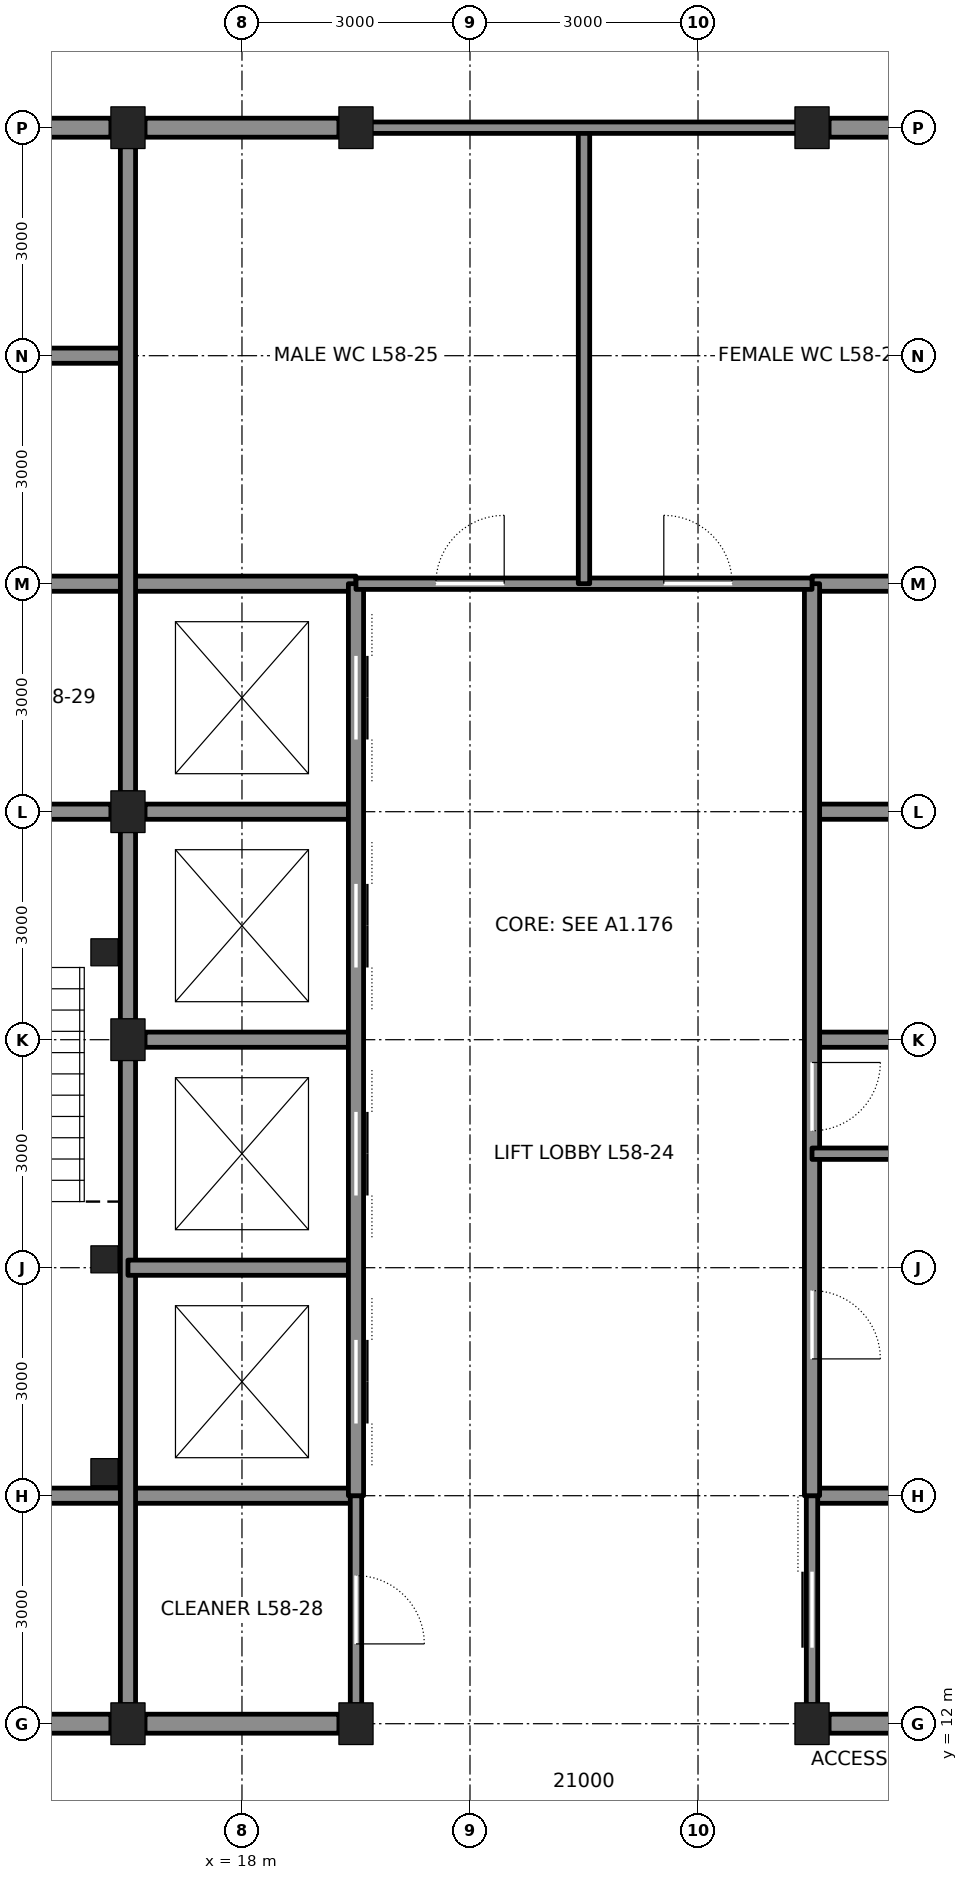
"""IFC4 building model, lengths in metres.
Left out: names, types, materials, properties, quantities, classifications, styles, units other than length and angle.
Written with IfcOpenShell. Run it as: python <this file> out.ifc"""

import sys

from ifc_helpers import new_model, si_unit, direction, frame, frame_2d, origin, origin_2d, place, context, subcontext, project, spatial, rectangle, hollow_rectangle, i_section, extrude, element, fill, save


model = new_model("IFC4")
c1 = context("Model", 3, precision=1e-05, world=origin(), true_north=direction((0.0, 1.0)))
c2 = subcontext(c1, "Body", "Model", "MODEL_VIEW")
j1 = project(units=[si_unit("LENGTHUNIT", "METRE"), si_unit("PLANEANGLEUNIT", "RADIAN")], contexts=[c1])
p1 = place(None, origin())
s1 = spatial("IfcSite", under=j1, at=p1, CompositionType="ELEMENT")
p2 = place(p1, origin())
s2 = spatial("IfcBuilding", under=s1, at=p2, CompositionType="ELEMENT")
p3 = place(p2, frame((0.0, 0.0, 262.2)))
s3 = spatial("IfcBuildingStorey", under=s2, at=p3, CompositionType="ELEMENT", Elevation=262.2)
for number, where, z_axis, x_axis in (
    (1, (16.5, 12.0, 0.0), (0.0, 0.0, 1.0), (1.0, 0.0, 0.0)),
    (2, (19.5, 12.0, 0.0), (0.0, 0.0, 1.0), (1.0, 0.0, 0.0)),
    (3, (25.5, 12.0, 0.0), (0.0, 0.0, 1.0), (1.0, 0.0, 0.0)),
    (4, (16.5, 33.0, 0.0), (0.0, 0.0, 1.0), (1.0, 0.0, 0.0)),
    (5, (19.5, 33.0, 0.0), (0.0, 0.0, 1.0), (1.0, 0.0, 0.0)),
    (6, (25.5, 33.0, 0.0), (0.0, 0.0, 1.0), (1.0, 0.0, 0.0)),
    (7, (16.5, 21.0, 0.0), (0.0, 0.0, 1.0), (1.0, 0.0, 0.0)),
    (8, (16.5, 24.0, 0.0), (0.0, 0.0, 1.0), (1.0, 0.0, 0.0)),
):
    element("IfcColumn", number, at=place(p3, frame(where, z_axis=z_axis, x_axis=x_axis)), inside=s3, PredefinedType="COLUMN", context=c2, shape_type="SweptSolid", body=[
        extrude(i_section(OverallWidth=0.449, OverallDepth=0.549, WebThickness=0.072, FlangeThickness=0.115, at=origin_2d()), origin(), (0.0, 0.0, 1.0), 4.2),
    ])
p4 = place(p3, frame((12.25, 12.0, 0.0), z_axis=(0.0, 0.0, 1.0), x_axis=(1.0, 0.0, 0.0)))
e9 = element("IfcWall", 9, at=p4, inside=s3, PredefinedType="SOLIDWALL", context=c2, shape_type="SweptSolid", body=[
    extrude(rectangle(XDim=4.025, YDim=0.25, at=frame_2d((2.013, 0.0))), origin(), (0.0, 0.0, 1.0), 3.182),
])
for number, where, z_axis, x_axis in (
    (10, (16.725, 12.0, 0.0), (0.0, 0.0, 1.0), (1.0, 0.0, 0.0)),
    (11, (25.725, 12.0, 0.0), (0.0, 0.0, 1.0), (1.0, 0.0, 0.0)),
):
    element("IfcWall", number, at=place(p3, frame(where, z_axis=z_axis, x_axis=x_axis)), inside=s3, PredefinedType="SOLIDWALL", context=c2, shape_type="SweptSolid", body=[
        extrude(rectangle(XDim=2.55, YDim=0.25, at=frame_2d((1.275, 0.0))), origin(), (0.0, 0.0, 1.0), 3.182),
    ])
for number, where, z_axis, x_axis in (
    (12, (12.0, 15.0, 0.0), (0.0, 0.0, 1.0), (1.0, 0.0, 0.0)),
    (13, (25.5, 15.0, 0.0), (0.0, 0.0, 1.0), (1.0, 0.0, 0.0)),
):
    element("IfcWall", number, at=place(p3, frame(where, z_axis=z_axis, x_axis=x_axis)), inside=s3, PredefinedType="SOLIDWALL", context=c2, shape_type="SweptSolid", body=[
        extrude(rectangle(XDim=7.5, YDim=0.2, at=frame_2d((3.75, 0.0))), origin(), (0.0, 0.0, 1.0), 4.04),
    ])
p5 = place(p3, frame((12.225, 24.0, 0.0), z_axis=(0.0, 0.0, 1.0), x_axis=(1.0, 0.0, 0.0)))
e14 = element("IfcWall", 14, at=p5, inside=s3, PredefinedType="SOLIDWALL", context=c2, shape_type="SweptSolid", body=[
    extrude(rectangle(XDim=4.05, YDim=0.2, at=frame_2d((2.025, 0.0))), origin(), (0.0, 0.0, 1.0), 3.09),
])
p6 = place(p5, frame((1.425, 0.0, 0.0)))
e15 = element("IfcOpeningElement", 15, at=p6, cuts=e14, PredefinedType="OPENING", context=c2, shape_type="SweptSolid", body=[
    extrude(rectangle(XDim=1.2, YDim=2.1, at=frame_2d((0.6, 1.05))), frame((0.0, 0.11, 0.0), z_axis=(0.0, -1.0, 0.0), x_axis=(1.0, 0.0, 0.0)), (0.0, 0.0, 1.0), 0.22),
])
for number, where, z_axis, x_axis in (
    (16, (16.725, 24.0, 0.0), (0.0, 0.0, 1.0), (1.0, 0.0, 0.0)),
    (17, (25.5, 24.0, 0.0), (0.0, 0.0, 1.0), (1.0, 0.0, 0.0)),
):
    element("IfcWall", number, at=place(p3, frame(where, z_axis=z_axis, x_axis=x_axis)), inside=s3, PredefinedType="SOLIDWALL", context=c2, shape_type="SweptSolid", body=[
        extrude(rectangle(XDim=2.775, YDim=0.2, at=frame_2d((1.388, 0.0))), origin(), (0.0, 0.0, 1.0), 3.09),
    ])
p7 = place(p3, frame((12.0, 27.0, 0.0), z_axis=(0.0, 0.0, 1.0), x_axis=(1.0, 0.0, 0.0)))
e18 = element("IfcWall", 18, at=p7, inside=s3, PredefinedType="SOLIDWALL", context=c2, shape_type="SweptSolid", body=[
    extrude(rectangle(XDim=7.5, YDim=0.2, at=frame_2d((3.75, 0.0))), origin(), (0.0, 0.0, 1.0), 4.04),
])
p8 = place(p7, frame((1.65, 0.0, 0.0)))
e19 = element("IfcOpeningElement", 19, at=p8, cuts=e18, PredefinedType="OPENING", context=c2, shape_type="SweptSolid", body=[
    extrude(rectangle(XDim=1.2, YDim=2.1, at=frame_2d((0.6, 1.05))), frame((0.0, 0.11, 0.0), z_axis=(0.0, -1.0, 0.0), x_axis=(1.0, 0.0, 0.0)), (0.0, 0.0, 1.0), 0.22),
])
p9 = place(p3, frame((25.5, 27.0, 0.0), z_axis=(0.0, 0.0, 1.0), x_axis=(1.0, 0.0, 0.0)))
e20 = element("IfcWall", 20, at=p9, inside=s3, PredefinedType="SOLIDWALL", context=c2, shape_type="SweptSolid", body=[
    extrude(rectangle(XDim=3.0, YDim=0.2, at=frame_2d((1.5, 0.0))), origin(), (0.0, 0.0, 1.0), 4.04),
])
p10 = place(p3, frame((12.0, 30.0, 0.0), z_axis=(0.0, 0.0, 1.0), x_axis=(1.0, 0.0, 0.0)))
e21 = element("IfcWall", 21, at=p10, inside=s3, PredefinedType="SOLIDWALL", context=c2, shape_type="SweptSolid", body=[
    extrude(rectangle(XDim=4.5, YDim=0.2, at=frame_2d((2.25, 0.0))), origin(), (0.0, 0.0, 1.0), 4.04),
])
p11 = place(p3, frame((12.25, 33.0, 0.0), z_axis=(0.0, 0.0, 1.0), x_axis=(1.0, 0.0, 0.0)))
e22 = element("IfcWall", 22, at=p11, inside=s3, PredefinedType="SOLIDWALL", context=c2, shape_type="SweptSolid", body=[
    extrude(rectangle(XDim=4.025, YDim=0.25, at=frame_2d((2.013, 0.0))), origin(), (0.0, 0.0, 1.0), 3.182),
])
for number, where, z_axis, x_axis in (
    (23, (16.725, 33.0, 0.0), (0.0, 0.0, 1.0), (1.0, 0.0, 0.0)),
    (24, (25.725, 33.0, 0.0), (0.0, 0.0, 1.0), (1.0, 0.0, 0.0)),
):
    element("IfcWall", number, at=place(p3, frame(where, z_axis=z_axis, x_axis=x_axis)), inside=s3, PredefinedType="SOLIDWALL", context=c2, shape_type="SweptSolid", body=[
        extrude(rectangle(XDim=2.55, YDim=0.25, at=frame_2d((1.275, 0.0))), origin(), (0.0, 0.0, 1.0), 3.182),
    ])
p12 = place(p3, frame((16.5, 12.25, 0.0), z_axis=(0.0, 0.0, 1.0), x_axis=(0.0, 1.0, 0.0)))
e25 = element("IfcWall", 25, at=p12, inside=s3, PredefinedType="SOLIDWALL", context=c2, shape_type="SweptSolid", body=[
    extrude(rectangle(XDim=8.5, YDim=0.2, at=frame_2d((4.25, 0.0))), origin(), (0.0, 0.0, 1.0), 3.113),
])
p13 = place(p3, frame((16.5, 21.25, 0.0), z_axis=(0.0, 0.0, 1.0), x_axis=(0.0, 1.0, 0.0)))
e26 = element("IfcWall", 26, at=p13, inside=s3, PredefinedType="SOLIDWALL", context=c2, shape_type="SweptSolid", body=[
    extrude(rectangle(XDim=2.5, YDim=0.2, at=frame_2d((1.25, 0.0))), origin(), (0.0, 0.0, 1.0), 3.113),
])
p14 = place(p3, frame((16.5, 24.25, 0.0), z_axis=(0.0, 0.0, 1.0), x_axis=(0.0, 1.0, 0.0)))
e27 = element("IfcWall", 27, at=p14, inside=s3, PredefinedType="SOLIDWALL", context=c2, shape_type="SweptSolid", body=[
    extrude(rectangle(XDim=8.5, YDim=0.2, at=frame_2d((4.25, 0.0))), origin(), (0.0, 0.0, 1.0), 3.113),
])
p15 = place(p3, frame((16.5, 18.0, 0.0), z_axis=(0.0, 0.0, 1.0), x_axis=(1.0, 0.0, 0.0)))
e28 = element("IfcWall", 28, at=p15, inside=s3, PredefinedType="SOLIDWALL", context=c2, shape_type="SweptSolid", body=[
    extrude(rectangle(XDim=3.0, YDim=0.2, at=frame_2d((1.5, 0.0))), origin(), (0.0, 0.0, 1.0), 4.04),
])
for number, where, z_axis, x_axis in (
    (29, (16.725, 21.0, 0.0), (0.0, 0.0, 1.0), (1.0, 0.0, 0.0)),
    (30, (25.5, 21.0, 0.0), (0.0, 0.0, 1.0), (1.0, 0.0, 0.0)),
):
    element("IfcWall", number, at=place(p3, frame(where, z_axis=z_axis, x_axis=x_axis)), inside=s3, PredefinedType="SOLIDWALL", context=c2, shape_type="SweptSolid", body=[
        extrude(rectangle(XDim=2.775, YDim=0.2, at=frame_2d((1.388, 0.0))), origin(), (0.0, 0.0, 1.0), 3.09),
    ])
p16 = place(p3, frame((19.5, 12.25, 0.0), z_axis=(0.0, 0.0, 1.0), x_axis=(0.0, 1.0, 0.0)))
e31 = element("IfcWall", 31, at=p16, inside=s3, PredefinedType="PARTITIONING", context=c2, shape_type="SweptSolid", body=[
    extrude(rectangle(XDim=2.75, YDim=0.15, at=frame_2d((1.375, 0.0))), origin(), (0.0, 0.0, 1.0), 3.065),
])
p17 = place(p16, frame((0.8, 0.0, 0.0)))
e32 = element("IfcOpeningElement", 32, at=p17, cuts=e31, PredefinedType="OPENING", context=c2, shape_type="SweptSolid", body=[
    extrude(rectangle(XDim=0.9, YDim=2.1, at=frame_2d((0.45, 1.05))), frame((0.0, 0.085, 0.0), z_axis=(0.0, -1.0, 0.0), x_axis=(1.0, 0.0, 0.0)), (0.0, 0.0, 1.0), 0.17),
])
p18 = place(p3, frame((19.5, 15.0, 0.0), z_axis=(0.0, 0.0, 1.0), x_axis=(0.0, 1.0, 0.0)))
e33 = element("IfcWall", 33, at=p18, inside=s3, PredefinedType="SOLIDWALL", context=c2, shape_type="SweptSolid", body=[
    extrude(rectangle(XDim=12.0, YDim=0.2, at=frame_2d((6.0, 0.0))), origin(), (0.0, 0.0, 1.0), 3.065),
])
p19 = place(p18, frame((0.95, 0.0, 0.0)))
e34 = element("IfcOpeningElement", 34, at=p19, cuts=e33, PredefinedType="OPENING", context=c2, shape_type="SweptSolid", body=[
    extrude(rectangle(XDim=1.1, YDim=2.1, at=frame_2d((0.55, 1.05))), frame((0.0, 0.11, 0.0), z_axis=(0.0, -1.0, 0.0), x_axis=(1.0, 0.0, 0.0)), (0.0, 0.0, 1.0), 0.22),
])
p20 = place(p18, frame((3.95, 0.0, 0.0)))
e35 = element("IfcOpeningElement", 35, at=p20, cuts=e33, PredefinedType="OPENING", context=c2, shape_type="SweptSolid", body=[
    extrude(rectangle(XDim=1.1, YDim=2.1, at=frame_2d((0.55, 1.05))), frame((0.0, 0.11, 0.0), z_axis=(0.0, -1.0, 0.0), x_axis=(1.0, 0.0, 0.0)), (0.0, 0.0, 1.0), 0.22),
])
p21 = place(p18, frame((6.95, 0.0, 0.0)))
e36 = element("IfcOpeningElement", 36, at=p21, cuts=e33, PredefinedType="OPENING", context=c2, shape_type="SweptSolid", body=[
    extrude(rectangle(XDim=1.1, YDim=2.1, at=frame_2d((0.55, 1.05))), frame((0.0, 0.11, 0.0), z_axis=(0.0, -1.0, 0.0), x_axis=(1.0, 0.0, 0.0)), (0.0, 0.0, 1.0), 0.22),
])
p22 = place(p18, frame((9.95, 0.0, 0.0)))
e37 = element("IfcOpeningElement", 37, at=p22, cuts=e33, PredefinedType="OPENING", context=c2, shape_type="SweptSolid", body=[
    extrude(rectangle(XDim=1.1, YDim=2.1, at=frame_2d((0.55, 1.05))), frame((0.0, 0.11, 0.0), z_axis=(0.0, -1.0, 0.0), x_axis=(1.0, 0.0, 0.0)), (0.0, 0.0, 1.0), 0.22),
])
p23 = place(p3, frame((25.5, 12.25, 0.0), z_axis=(0.0, 0.0, 1.0), x_axis=(0.0, 1.0, 0.0)))
e38 = element("IfcWall", 38, at=p23, inside=s3, PredefinedType="PARTITIONING", context=c2, shape_type="SweptSolid", body=[
    extrude(rectangle(XDim=2.75, YDim=0.15, at=frame_2d((1.375, 0.0))), origin(), (0.0, 0.0, 1.0), 3.065),
])
p24 = place(p23, frame((0.75, 0.0, 0.0)))
e39 = element("IfcOpeningElement", 39, at=p24, cuts=e38, PredefinedType="OPENING", context=c2, shape_type="SweptSolid", body=[
    extrude(rectangle(XDim=1.0, YDim=2.1, at=frame_2d((0.5, 1.05))), frame((0.0, 0.085, 0.0), z_axis=(0.0, -1.0, 0.0), x_axis=(1.0, 0.0, 0.0)), (0.0, 0.0, 1.0), 0.17),
])
p25 = place(p3, frame((25.5, 15.0, 0.0), z_axis=(0.0, 0.0, 1.0), x_axis=(0.0, 1.0, 0.0)))
e40 = element("IfcWall", 40, at=p25, inside=s3, PredefinedType="SOLIDWALL", context=c2, shape_type="SweptSolid", body=[
    extrude(rectangle(XDim=12.0, YDim=0.2, at=frame_2d((6.0, 0.0))), origin(), (0.0, 0.0, 1.0), 3.065),
])
p26 = place(p25, frame((1.8, 0.0, 0.0)))
e41 = element("IfcOpeningElement", 41, at=p26, cuts=e40, PredefinedType="OPENING", context=c2, shape_type="SweptSolid", body=[
    extrude(rectangle(XDim=0.9, YDim=2.1, at=frame_2d((0.45, 1.05))), frame((0.0, 0.11, 0.0), z_axis=(0.0, -1.0, 0.0), x_axis=(1.0, 0.0, 0.0)), (0.0, 0.0, 1.0), 0.22),
])
p27 = place(p25, frame((4.8, 0.0, 0.0)))
e42 = element("IfcOpeningElement", 42, at=p27, cuts=e40, PredefinedType="OPENING", context=c2, shape_type="SweptSolid", body=[
    extrude(rectangle(XDim=0.9, YDim=2.1, at=frame_2d((0.45, 1.05))), frame((0.0, 0.11, 0.0), z_axis=(0.0, -1.0, 0.0), x_axis=(1.0, 0.0, 0.0)), (0.0, 0.0, 1.0), 0.22),
])
p28 = place(p3, frame((19.5, 27.0, 0.0), z_axis=(0.0, 0.0, 1.0), x_axis=(1.0, 0.0, 0.0)))
e43 = element("IfcWall", 43, at=p28, inside=s3, PredefinedType="PARTITIONING", context=c2, shape_type="SweptSolid", body=[
    extrude(rectangle(XDim=6.0, YDim=0.15, at=frame_2d((3.0, 0.0))), origin(), (0.0, 0.0, 1.0), 4.04),
])
p29 = place(p28, frame((1.05, 0.0, 0.0)))
e44 = element("IfcOpeningElement", 44, at=p29, cuts=e43, PredefinedType="OPENING", context=c2, shape_type="SweptSolid", body=[
    extrude(rectangle(XDim=0.9, YDim=2.1, at=frame_2d((0.45, 1.05))), frame((0.0, 0.085, 0.0), z_axis=(0.0, -1.0, 0.0), x_axis=(1.0, 0.0, 0.0)), (0.0, 0.0, 1.0), 0.17),
])
p30 = place(p28, frame((4.05, 0.0, 0.0)))
e45 = element("IfcOpeningElement", 45, at=p30, cuts=e43, PredefinedType="OPENING", context=c2, shape_type="SweptSolid", body=[
    extrude(rectangle(XDim=0.9, YDim=2.1, at=frame_2d((0.45, 1.05))), frame((0.0, 0.085, 0.0), z_axis=(0.0, -1.0, 0.0), x_axis=(1.0, 0.0, 0.0)), (0.0, 0.0, 1.0), 0.17),
])
p31 = place(p3, frame((22.5, 27.0, 0.0), z_axis=(0.0, 0.0, 1.0), x_axis=(0.0, 1.0, 0.0)))
e46 = element("IfcWall", 46, at=p31, inside=s3, PredefinedType="PARTITIONING", context=c2, shape_type="SweptSolid", body=[
    extrude(rectangle(XDim=6.0, YDim=0.15, at=frame_2d((3.0, 0.0))), origin(), (0.0, 0.0, 1.0), 4.04),
])
p32 = place(p3, frame((19.5, 33.0, 0.0), z_axis=(0.0, 0.0, 1.0), x_axis=(1.0, 0.0, 0.0)))
e47 = element("IfcWall", 47, at=p32, inside=s3, PredefinedType="PARTITIONING", context=c2, shape_type="SweptSolid", body=[
    extrude(rectangle(XDim=6.0, YDim=0.15, at=frame_2d((3.0, 0.0))), origin(), (0.0, 0.0, 1.0), 3.182),
])
p33 = place(p3, frame((25.5, 19.5, 0.0), z_axis=(0.0, 0.0, 1.0), x_axis=(1.0, 0.0, 0.0)))
e48 = element("IfcWall", 48, at=p33, inside=s3, PredefinedType="PARTITIONING", context=c2, shape_type="SweptSolid", body=[
    extrude(rectangle(XDim=3.0, YDim=0.15, at=frame_2d((1.5, 0.0))), origin(), (0.0, 0.0, 1.0), 4.04),
])
for number, where, z_axis, x_axis in (
    (49, (16.19, 15.31, 0.0), (0.0, 0.0, 1.0), (1.0, 0.0, 0.0)),
    (50, (16.19, 18.11, 0.0), (0.0, 0.0, 1.0), (1.0, 0.0, 0.0)),
    (51, (16.19, 22.15, 0.0), (0.0, 0.0, 1.0), (1.0, 0.0, 0.0)),
):
    element("IfcColumn", number, at=place(p3, frame(where, z_axis=z_axis, x_axis=x_axis)), inside=s3, PredefinedType="COLUMN", context=c2, shape_type="SweptSolid", body=[
        extrude(hollow_rectangle(XDim=0.356, YDim=0.356, WallThickness=0.009, at=origin_2d()), origin(), (0.0, 0.0, 1.0), 4.2),
    ])
p34 = place(p29, origin())
e52 = element("IfcDoor", 52, at=p34, inside=s3, OperationType="SINGLE_SWING_RIGHT", PredefinedType="DOOR", context=c2, shape_type="SweptSolid", body=[
    extrude(rectangle(XDim=0.9, YDim=2.1, at=frame_2d((0.45, 1.05))), frame((0.0, 0.025, 0.0), z_axis=(0.0, -1.0, 0.0), x_axis=(1.0, 0.0, 0.0)), (0.0, 0.0, 1.0), 0.05),
])
fill(e44, e52)
p35 = place(p30, origin())
e53 = element("IfcDoor", 53, at=p35, inside=s3, OperationType="SINGLE_SWING_LEFT", PredefinedType="DOOR", context=c2, shape_type="SweptSolid", body=[
    extrude(rectangle(XDim=0.9, YDim=2.1, at=frame_2d((0.45, 1.05))), frame((0.0, 0.025, 0.0), z_axis=(0.0, -1.0, 0.0), x_axis=(1.0, 0.0, 0.0)), (0.0, 0.0, 1.0), 0.05),
])
fill(e45, e53)
p36 = place(p24, origin())
e54 = element("IfcDoor", 54, at=p36, inside=s3, OperationType="SLIDING_TO_LEFT", PredefinedType="DOOR", context=c2, shape_type="SweptSolid", body=[
    extrude(rectangle(XDim=1.0, YDim=2.1, at=frame_2d((0.5, 1.05))), frame((0.0, 0.025, 0.0), z_axis=(0.0, -1.0, 0.0), x_axis=(1.0, 0.0, 0.0)), (0.0, 0.0, 1.0), 0.05),
])
fill(e39, e54)
p37 = place(p26, frame((0.9, 0.0, 0.0), z_axis=(0.0, 0.0, 1.0), x_axis=(-1.0, 0.0, 0.0)))
e55 = element("IfcDoor", 55, at=p37, inside=s3, OperationType="SINGLE_SWING_RIGHT", PredefinedType="DOOR", context=c2, shape_type="SweptSolid", body=[
    extrude(rectangle(XDim=0.9, YDim=2.1, at=frame_2d((0.45, 1.05))), frame((0.0, 0.025, 0.0), z_axis=(0.0, -1.0, 0.0), x_axis=(1.0, 0.0, 0.0)), (0.0, 0.0, 1.0), 0.05),
])
fill(e41, e55)
p38 = place(p27, frame((0.9, 0.0, 0.0), z_axis=(0.0, 0.0, 1.0), x_axis=(-1.0, 0.0, 0.0)))
e56 = element("IfcDoor", 56, at=p38, inside=s3, OperationType="SINGLE_SWING_LEFT", PredefinedType="DOOR", context=c2, shape_type="SweptSolid", body=[
    extrude(rectangle(XDim=0.9, YDim=2.1, at=frame_2d((0.45, 1.05))), frame((0.0, 0.025, 0.0), z_axis=(0.0, -1.0, 0.0), x_axis=(1.0, 0.0, 0.0)), (0.0, 0.0, 1.0), 0.05),
])
fill(e42, e56)
p39 = place(p17, frame((0.9, 0.0, 0.0), z_axis=(0.0, 0.0, 1.0), x_axis=(-1.0, 0.0, 0.0)))
e57 = element("IfcDoor", 57, at=p39, inside=s3, OperationType="SINGLE_SWING_RIGHT", PredefinedType="DOOR", context=c2, shape_type="SweptSolid", body=[
    extrude(rectangle(XDim=0.9, YDim=2.1, at=frame_2d((0.45, 1.05))), frame((0.0, 0.025, 0.0), z_axis=(0.0, -1.0, 0.0), x_axis=(1.0, 0.0, 0.0)), (0.0, 0.0, 1.0), 0.05),
])
fill(e32, e57)
p40 = place(p19, origin())
e58 = element("IfcDoor", 58, at=p40, inside=s3, OperationType="DOUBLE_DOOR_SLIDING", PredefinedType="DOOR", context=c2, shape_type="SweptSolid", body=[
    extrude(rectangle(XDim=1.1, YDim=2.1, at=frame_2d((0.55, 1.05))), frame((0.0, 0.025, 0.0), z_axis=(0.0, -1.0, 0.0), x_axis=(1.0, 0.0, 0.0)), (0.0, 0.0, 1.0), 0.05),
])
fill(e34, e58)
p41 = place(p20, origin())
e59 = element("IfcDoor", 59, at=p41, inside=s3, OperationType="DOUBLE_DOOR_SLIDING", PredefinedType="DOOR", context=c2, shape_type="SweptSolid", body=[
    extrude(rectangle(XDim=1.1, YDim=2.1, at=frame_2d((0.55, 1.05))), frame((0.0, 0.025, 0.0), z_axis=(0.0, -1.0, 0.0), x_axis=(1.0, 0.0, 0.0)), (0.0, 0.0, 1.0), 0.05),
])
fill(e35, e59)
p42 = place(p21, origin())
e60 = element("IfcDoor", 60, at=p42, inside=s3, OperationType="DOUBLE_DOOR_SLIDING", PredefinedType="DOOR", context=c2, shape_type="SweptSolid", body=[
    extrude(rectangle(XDim=1.1, YDim=2.1, at=frame_2d((0.55, 1.05))), frame((0.0, 0.025, 0.0), z_axis=(0.0, -1.0, 0.0), x_axis=(1.0, 0.0, 0.0)), (0.0, 0.0, 1.0), 0.05),
])
fill(e36, e60)
p43 = place(p22, origin())
e61 = element("IfcDoor", 61, at=p43, inside=s3, OperationType="DOUBLE_DOOR_SLIDING", PredefinedType="DOOR", context=c2, shape_type="SweptSolid", body=[
    extrude(rectangle(XDim=1.1, YDim=2.1, at=frame_2d((0.55, 1.05))), frame((0.0, 0.025, 0.0), z_axis=(0.0, -1.0, 0.0), x_axis=(1.0, 0.0, 0.0)), (0.0, 0.0, 1.0), 0.05),
])
fill(e37, e61)
save(model, sys.argv[1])
